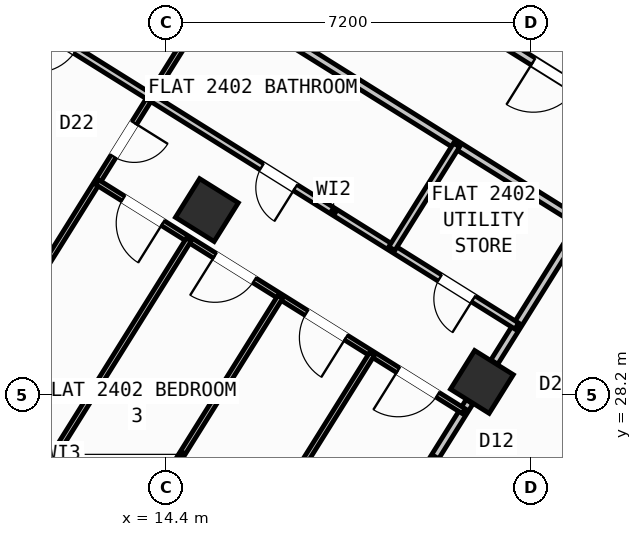
"""IFC4 building model, lengths in metres.
Left out: names, types, materials, properties, quantities, classifications, styles, units other than length and angle.
Written with IfcOpenShell. Run it as: python <this file> out.ifc"""

import sys

from ifc_helpers import new_model, si_unit, direction, frame, frame_2d, origin, origin_2d, place, context, subcontext, project, spatial, rectangle, hollow_rectangle, extrude, source, transform, mapped, element, fill, save


model = new_model("IFC4")
c1 = context("Model", 3, precision=1e-05, world=origin(), true_north=direction((0.0, 1.0)))
c2 = subcontext(c1, "Body", "Model", "MODEL_VIEW")
j1 = project(units=[si_unit("LENGTHUNIT", "METRE"), si_unit("PLANEANGLEUNIT", "RADIAN")], contexts=[c1])
p1 = place(None, origin())
s1 = spatial("IfcSite", under=j1, at=p1, CompositionType="ELEMENT")
p2 = place(p1, origin())
s2 = spatial("IfcBuilding", under=s1, at=p2, CompositionType="ELEMENT")
p3 = place(p2, frame((0.0, 0.0, 97.2)))
s3 = spatial("IfcBuildingStorey", under=s2, at=p3, CompositionType="ELEMENT", Elevation=97.2)
m1 = source(origin(), c2, "Body", "SweptSolid", [
    extrude(hollow_rectangle(XDim=0.9, YDim=0.9, WallThickness=0.036, at=origin_2d()), origin(), (0.0, 0.0, 1.0), 3.6),
])
for number, where, z_axis, x_axis in (
    (1, (20.632, 28.452, 0.0), (0.0, 0.0, 1.0), (-0.848, 0.53, 0.0)),
    (2, (15.205, 31.844, 0.0), (0.0, 0.0, 1.0), (-0.848, 0.53, 0.0)),
):
    element("IfcColumn", number, at=place(p3, frame(where, z_axis=z_axis, x_axis=x_axis)), inside=s3, PredefinedType="COLUMN", context=c2, shape_type="MappedRepresentation", body=[
        mapped(m1, transform((0.0, 0.0, 0.0), scale=1.0)),
    ])
p4 = place(p3, frame((31.76, 12.183, 0.0), z_axis=(0.0, 0.0, 1.0), x_axis=(-0.848047074256, 0.529920899612, 0.0)))
e3 = element("IfcWall", 3, at=p4, inside=s3, PredefinedType="STANDARD", context=c2, shape_type="SweptSolid", body=[
    extrude(rectangle(XDim=30.652, YDim=0.32, at=frame_2d((15.326, 0.0))), origin(), (0.0, 0.0, 1.0), 3.32),
])
p5 = place(p4, frame((15.153, 0.0, 0.0)))
e4 = element("IfcOpeningElement", 4, at=p5, cuts=e3, PredefinedType="OPENING", context=c2, shape_type="SweptSolid", body=[
    extrude(rectangle(XDim=1.2, YDim=2.15, at=frame_2d((0.6, 1.075))), frame((0.0, 0.17, 0.0), z_axis=(0.0, -1.0, 0.0), x_axis=(1.0, 0.0, 0.0)), (0.0, 0.0, 1.0), 0.34),
])
p6 = place(p4, frame((2.002, 0.0, 0.8)))
e5 = element("IfcOpeningElement", 5, at=p6, cuts=e3, PredefinedType="OPENING", context=c2, shape_type="SweptSolid", body=[
    extrude(rectangle(XDim=2.1, YDim=1.55, at=frame_2d((1.05, 0.775))), frame((0.0, 0.17, 0.0), z_axis=(0.0, -1.0, 0.0), x_axis=(1.0, 0.0, 0.0)), (0.0, 0.0, 1.0), 0.34),
])
p7 = place(p4, frame((7.206, 0.0, 0.8)))
e6 = element("IfcOpeningElement", 6, at=p7, cuts=e3, PredefinedType="OPENING", context=c2, shape_type="SweptSolid", body=[
    extrude(rectangle(XDim=2.1, YDim=1.55, at=frame_2d((1.05, 0.775))), frame((0.0, 0.17, 0.0), z_axis=(0.0, -1.0, 0.0), x_axis=(1.0, 0.0, 0.0)), (0.0, 0.0, 1.0), 0.34),
])
p8 = place(p4, frame((12.648, 0.0, 1.0)))
e7 = element("IfcOpeningElement", 7, at=p8, cuts=e3, PredefinedType="OPENING", context=c2, shape_type="SweptSolid", body=[
    extrude(rectangle(XDim=0.9, YDim=1.25, at=frame_2d((0.45, 0.625))), frame((0.0, 0.17, 0.0), z_axis=(0.0, -1.0, 0.0), x_axis=(1.0, 0.0, 0.0)), (0.0, 0.0, 1.0), 0.34),
])
p9 = place(p4, frame((27.974, 0.0, 0.95)))
e8 = element("IfcOpeningElement", 8, at=p9, cuts=e3, PredefinedType="OPENING", context=c2, shape_type="SweptSolid", body=[
    extrude(rectangle(XDim=1.2, YDim=1.4, at=frame_2d((0.6, 0.7))), frame((0.0, 0.17, 0.0), z_axis=(0.0, -1.0, 0.0), x_axis=(1.0, 0.0, 0.0)), (0.0, 0.0, 1.0), 0.34),
])
p10 = place(p4, frame((18.347, 0.0, 1.0)))
e9 = element("IfcOpeningElement", 9, at=p10, cuts=e3, PredefinedType="OPENING", context=c2, shape_type="SweptSolid", body=[
    extrude(rectangle(XDim=0.9, YDim=1.25, at=frame_2d((0.45, 0.625))), frame((0.0, 0.17, 0.0), z_axis=(0.0, -1.0, 0.0), x_axis=(1.0, 0.0, 0.0)), (0.0, 0.0, 1.0), 0.34),
])
p11 = place(p4, frame((20.931, 0.0, 1.0)))
e10 = element("IfcOpeningElement", 10, at=p11, cuts=e3, PredefinedType="OPENING", context=c2, shape_type="SweptSolid", body=[
    extrude(rectangle(XDim=0.65, YDim=1.15, at=frame_2d((0.325, 0.575))), frame((0.0, 0.17, 0.0), z_axis=(0.0, -1.0, 0.0), x_axis=(1.0, 0.0, 0.0)), (0.0, 0.0, 1.0), 0.34),
])
p12 = place(p4, frame((22.938, 0.0, 1.0)))
e11 = element("IfcOpeningElement", 11, at=p12, cuts=e3, PredefinedType="OPENING", context=c2, shape_type="SweptSolid", body=[
    extrude(rectangle(XDim=0.9, YDim=1.25, at=frame_2d((0.45, 0.625))), frame((0.0, 0.17, 0.0), z_axis=(0.0, -1.0, 0.0), x_axis=(1.0, 0.0, 0.0)), (0.0, 0.0, 1.0), 0.34),
])
p13 = place(p4, frame((25.069, 0.0, 1.0)))
e12 = element("IfcOpeningElement", 12, at=p13, cuts=e3, PredefinedType="OPENING", context=c2, shape_type="SweptSolid", body=[
    extrude(rectangle(XDim=0.9, YDim=1.25, at=frame_2d((0.45, 0.625))), frame((0.0, 0.17, 0.0), z_axis=(0.0, -1.0, 0.0), x_axis=(1.0, 0.0, 0.0)), (0.0, 0.0, 1.0), 0.34),
])
p14 = place(p3, frame((5.7, 28.71, 0.0), z_axis=(0.0, 0.0, 1.0), x_axis=(0.529923711467, 0.8480453172, 0.0)))
e13 = element("IfcWall", 13, at=p14, inside=s3, PredefinedType="STANDARD", context=c2, shape_type="SweptSolid", body=[
    extrude(rectangle(XDim=21.587, YDim=0.32, at=frame_2d((10.794, 0.0))), origin(), (0.0, 0.0, 1.0), 2.745),
])
p15 = place(p14, frame((2.994, 0.0, 0.8)))
e14 = element("IfcOpeningElement", 14, at=p15, cuts=e13, PredefinedType="OPENING", context=c2, shape_type="SweptSolid", body=[
    extrude(rectangle(XDim=2.1, YDim=1.55, at=frame_2d((1.05, 0.775))), frame((0.0, 0.17, 0.0), z_axis=(0.0, -1.0, 0.0), x_axis=(1.0, 0.0, 0.0)), (0.0, 0.0, 1.0), 0.34),
])
p16 = place(p14, frame((9.739, 0.0, 1.0)))
e15 = element("IfcOpeningElement", 15, at=p16, cuts=e13, PredefinedType="OPENING", context=c2, shape_type="SweptSolid", body=[
    extrude(rectangle(XDim=0.9, YDim=1.25, at=frame_2d((0.45, 0.625))), frame((0.0, 0.17, 0.0), z_axis=(0.0, -1.0, 0.0), x_axis=(1.0, 0.0, 0.0)), (0.0, 0.0, 1.0), 0.34),
])
p17 = place(p14, frame((18.639, 0.0, 0.85)))
e16 = element("IfcOpeningElement", 16, at=p17, cuts=e13, PredefinedType="OPENING", context=c2, shape_type="SweptSolid", body=[
    extrude(rectangle(XDim=1.5, YDim=1.5, at=frame_2d((0.75, 0.75))), frame((0.0, 0.17, 0.0), z_axis=(0.0, -1.0, 0.0), x_axis=(1.0, 0.0, 0.0)), (0.0, 0.0, 1.0), 0.34),
])
p18 = place(p3, frame((17.424, 47.083, 0.0), z_axis=(0.0, 0.0, 1.0), x_axis=(0.848049927979, -0.529916332693, 0.0)))
e17 = element("IfcWall", 17, at=p18, inside=s3, PredefinedType="STANDARD", context=c2, shape_type="SweptSolid", body=[
    extrude(rectangle(XDim=29.223, YDim=0.32, at=frame_2d((14.612, 0.0))), origin(), (0.0, 0.0, 1.0), 3.32),
])
p19 = place(p18, frame((3.745, 0.0, 0.0)))
e18 = element("IfcOpeningElement", 18, at=p19, cuts=e17, PredefinedType="OPENING", context=c2, shape_type="SweptSolid", body=[
    extrude(rectangle(XDim=1.05, YDim=2.15, at=frame_2d((0.525, 1.075))), frame((0.0, 0.17, 0.0), z_axis=(0.0, -1.0, 0.0), x_axis=(1.0, 0.0, 0.0)), (0.0, 0.0, 1.0), 0.34),
])
p20 = place(p18, frame((0.699, 0.0, 0.95)))
e19 = element("IfcOpeningElement", 19, at=p20, cuts=e17, PredefinedType="OPENING", context=c2, shape_type="SweptSolid", body=[
    extrude(rectangle(XDim=1.2, YDim=1.4, at=frame_2d((0.6, 0.7))), frame((0.0, 0.17, 0.0), z_axis=(0.0, -1.0, 0.0), x_axis=(1.0, 0.0, 0.0)), (0.0, 0.0, 1.0), 0.34),
])
p21 = place(p18, frame((6.951, 0.0, 1.0)))
e20 = element("IfcOpeningElement", 20, at=p21, cuts=e17, PredefinedType="OPENING", context=c2, shape_type="SweptSolid", body=[
    extrude(rectangle(XDim=0.9, YDim=1.25, at=frame_2d((0.45, 0.625))), frame((0.0, 0.17, 0.0), z_axis=(0.0, -1.0, 0.0), x_axis=(1.0, 0.0, 0.0)), (0.0, 0.0, 1.0), 0.34),
])
p22 = place(p18, frame((9.841, 0.0, 0.85)))
e21 = element("IfcOpeningElement", 21, at=p22, cuts=e17, PredefinedType="OPENING", context=c2, shape_type="SweptSolid", body=[
    extrude(rectangle(XDim=1.5, YDim=1.5, at=frame_2d((0.75, 0.75))), frame((0.0, 0.17, 0.0), z_axis=(0.0, -1.0, 0.0), x_axis=(1.0, 0.0, 0.0)), (0.0, 0.0, 1.0), 0.34),
])
p23 = place(p18, frame((13.889, 0.0, 0.95)))
e22 = element("IfcOpeningElement", 22, at=p23, cuts=e17, PredefinedType="OPENING", context=c2, shape_type="SweptSolid", body=[
    extrude(rectangle(XDim=1.2, YDim=1.4, at=frame_2d((0.6, 0.7))), frame((0.0, 0.17, 0.0), z_axis=(0.0, -1.0, 0.0), x_axis=(1.0, 0.0, 0.0)), (0.0, 0.0, 1.0), 0.34),
])
p24 = place(p18, frame((17.254, 0.0, 1.0)))
e23 = element("IfcOpeningElement", 23, at=p24, cuts=e17, PredefinedType="OPENING", context=c2, shape_type="SweptSolid", body=[
    extrude(rectangle(XDim=0.9, YDim=1.25, at=frame_2d((0.45, 0.625))), frame((0.0, 0.17, 0.0), z_axis=(0.0, -1.0, 0.0), x_axis=(1.0, 0.0, 0.0)), (0.0, 0.0, 1.0), 0.34),
])
p25 = place(p18, frame((20.764, 0.0, 0.8)))
e24 = element("IfcOpeningElement", 24, at=p25, cuts=e17, PredefinedType="OPENING", context=c2, shape_type="SweptSolid", body=[
    extrude(rectangle(XDim=2.1, YDim=1.55, at=frame_2d((1.05, 0.775))), frame((0.0, 0.17, 0.0), z_axis=(0.0, -1.0, 0.0), x_axis=(1.0, 0.0, 0.0)), (0.0, 0.0, 1.0), 0.34),
])
p26 = place(p18, frame((25.403, 0.0, 0.8)))
e25 = element("IfcOpeningElement", 25, at=p26, cuts=e17, PredefinedType="OPENING", context=c2, shape_type="SweptSolid", body=[
    extrude(rectangle(XDim=2.1, YDim=1.55, at=frame_2d((1.05, 0.775))), frame((0.0, 0.17, 0.0), z_axis=(0.0, -1.0, 0.0), x_axis=(1.0, 0.0, 0.0)), (0.0, 0.0, 1.0), 0.34),
])
p27 = place(p3, frame((25.807, 29.582, 0.0), z_axis=(0.0, 0.0, 1.0), x_axis=(-0.529920357077, -0.848047413271, 0.0)))
e26 = element("IfcWall", 26, at=p27, inside=s3, PredefinedType="PARTITIONING", context=c2, shape_type="SweptSolid", body=[
    extrude(rectangle(XDim=11.45, YDim=0.16, at=frame_2d((5.725, 0.0))), origin(), (0.0, 0.0, 1.0), 3.31),
])
p28 = place(p3, frame((26.973, 31.447, 0.0), z_axis=(0.0, 0.0, 1.0), x_axis=(-0.848048310262, 0.529918921593, 0.0)))
e27 = element("IfcWall", 27, at=p28, inside=s3, PredefinedType="PARTITIONING", context=c2, shape_type="SweptSolid", body=[
    extrude(rectangle(XDim=16.73, YDim=0.16, at=frame_2d((8.365, 0.0))), origin(), (0.0, 0.0, 1.0), 3.31),
])
p29 = place(p28, frame((2.22, 0.0, 0.0)))
e28 = element("IfcOpeningElement", 28, at=p29, cuts=e27, PredefinedType="OPENING", context=c2, shape_type="SweptSolid", body=[
    extrude(rectangle(XDim=0.86, YDim=2.05, at=frame_2d((0.43, 1.025))), frame((0.0, 0.09, 0.0), z_axis=(0.0, -1.0, 0.0), x_axis=(1.0, 0.0, 0.0)), (0.0, 0.0, 1.0), 0.18),
])
p30 = place(p28, frame((5.28, 0.0, 0.0)))
e29 = element("IfcOpeningElement", 29, at=p30, cuts=e27, PredefinedType="OPENING", context=c2, shape_type="SweptSolid", body=[
    extrude(rectangle(XDim=1.0, YDim=2.1, at=frame_2d((0.5, 1.05))), frame((0.0, 0.09, 0.0), z_axis=(0.0, -1.0, 0.0), x_axis=(1.0, 0.0, 0.0)), (0.0, 0.0, 1.0), 0.18),
])
p31 = place(p3, frame((25.807, 29.582, 0.0), z_axis=(0.0, 0.0, 1.0), x_axis=(-0.848052408131, 0.529912363569, 0.0)))
e30 = element("IfcWall", 30, at=p31, inside=s3, PredefinedType="PARTITIONING", context=c2, shape_type="SweptSolid", body=[
    extrude(rectangle(XDim=16.73, YDim=0.16, at=frame_2d((8.365, 0.0))), origin(), (0.0, 0.0, 1.0), 3.31),
])
p32 = place(p31, frame((2.22, 0.0, 0.0)))
e31 = element("IfcOpeningElement", 31, at=p32, cuts=e30, PredefinedType="OPENING", context=c2, shape_type="SweptSolid", body=[
    extrude(rectangle(XDim=0.86, YDim=2.05, at=frame_2d((0.43, 1.025))), frame((0.0, 0.09, 0.0), z_axis=(0.0, -1.0, 0.0), x_axis=(1.0, 0.0, 0.0)), (0.0, 0.0, 1.0), 0.18),
])
p33 = place(p31, frame((14.013, 0.0, 0.0)))
e32 = element("IfcOpeningElement", 32, at=p33, cuts=e30, PredefinedType="OPENING", context=c2, shape_type="SweptSolid", body=[
    extrude(rectangle(XDim=1.0, YDim=2.1, at=frame_2d((0.5, 1.05))), frame((0.0, 0.09, 0.0), z_axis=(0.0, -1.0, 0.0), x_axis=(1.0, 0.0, 0.0)), (0.0, 0.0, 1.0), 0.18),
])
p34 = place(p3, frame((22.593, 31.59, 0.0), z_axis=(0.0, 0.0, 1.0), x_axis=(-0.529924383291, -0.848044897393, 0.0)))
e33 = element("IfcWall", 33, at=p34, inside=s3, PredefinedType="PARTITIONING", context=c2, shape_type="SweptSolid", body=[
    extrude(rectangle(XDim=3.238, YDim=0.16, at=frame_2d((1.619, 0.0))), origin(), (0.0, 0.0, 1.0), 2.745),
])
p35 = place(p3, frame((20.387, 28.06, 0.0), z_axis=(0.0, 0.0, 1.0), x_axis=(-0.529902564924, -0.848058530814, 0.0)))
e34 = element("IfcWall", 34, at=p35, inside=s3, PredefinedType="PARTITIONING", context=c2, shape_type="SweptSolid", body=[
    extrude(rectangle(XDim=6.376, YDim=0.16, at=frame_2d((3.188, 0.0))), origin(), (0.0, 0.0, 1.0), 2.745),
])
p36 = place(p3, frame((24.492, 30.403, 0.0), z_axis=(0.0, 0.0, 1.0), x_axis=(-0.529919283494, -0.848048084121, 0.0)))
e35 = element("IfcWall", 35, at=p36, inside=s3, PredefinedType="PLUMBINGWALL", context=c2, shape_type="SweptSolid", body=[
    extrude(rectangle(XDim=5.51, YDim=0.14, at=frame_2d((2.755, 0.0))), origin(), (0.0, 0.0, 1.0), 2.935),
])
p37 = place(p36, frame((2.365, 0.0, 0.0)))
e36 = element("IfcOpeningElement", 36, at=p37, cuts=e35, PredefinedType="OPENING", context=c2, shape_type="SweptSolid", body=[
    extrude(rectangle(XDim=0.78, YDim=2.05, at=frame_2d((0.39, 1.025))), frame((0.0, 0.08, 0.0), z_axis=(0.0, -1.0, 0.0), x_axis=(1.0, 0.0, 0.0)), (0.0, 0.0, 1.0), 0.16),
])
p38 = place(p3, frame((15.361, 36.108, 0.0), z_axis=(0.0, 0.0, 1.0), x_axis=(-0.529912802348, -0.848052133956, 0.0)))
e37 = element("IfcWall", 37, at=p38, inside=s3, PredefinedType="PARTITIONING", context=c2, shape_type="SweptSolid", body=[
    extrude(rectangle(XDim=11.72, YDim=0.11, at=frame_2d((5.86, 0.0))), origin(), (0.0, 0.0, 1.0), 2.935),
])
p39 = place(p38, frame((3.0, 0.0, 0.0)))
e38 = element("IfcOpeningElement", 38, at=p39, cuts=e37, PredefinedType="OPENING", context=c2, shape_type="SweptSolid", body=[
    extrude(rectangle(XDim=0.78, YDim=2.05, at=frame_2d((0.39, 1.025))), frame((0.0, 0.065, 0.0), z_axis=(0.0, -1.0, 0.0), x_axis=(1.0, 0.0, 0.0)), (0.0, 0.0, 1.0), 0.13),
])
p40 = place(p3, frame((14.09, 34.073, 0.0), z_axis=(0.0, 0.0, 1.0), x_axis=(-0.848045135007, 0.529924003034, 0.0)))
e39 = element("IfcWall", 39, at=p40, inside=s3, PredefinedType="PLUMBINGWALL", context=c2, shape_type="SweptSolid", body=[
    extrude(rectangle(XDim=4.393, YDim=0.14, at=frame_2d((2.196, 0.0))), origin(), (0.0, 0.0, 1.0), 3.31),
])
p41 = place(p40, frame((1.737, 0.0, 0.0)))
e40 = element("IfcOpeningElement", 40, at=p41, cuts=e39, PredefinedType="OPENING", context=c2, shape_type="SweptSolid", body=[
    extrude(rectangle(XDim=0.92, YDim=2.08, at=frame_2d((0.46, 1.04))), frame((0.0, 0.08, 0.0), z_axis=(0.0, -1.0, 0.0), x_axis=(1.0, 0.0, 0.0)), (0.0, 0.0, 1.0), 0.16),
])
p42 = place(p3, frame((21.321, 29.554, 0.0), z_axis=(0.0, 0.0, 1.0), x_axis=(-0.84803529765, 0.529939745575, 0.0)))
e41 = element("IfcWall", 41, at=p42, inside=s3, PredefinedType="PLUMBINGWALL", context=c2, shape_type="SweptSolid", body=[
    extrude(rectangle(XDim=8.527, YDim=0.14, at=frame_2d((4.264, 0.0))), origin(), (0.0, 0.0, 1.0), 3.31),
])
p43 = place(p42, frame((5.155, 0.0, 0.0)))
e42 = element("IfcOpeningElement", 42, at=p43, cuts=e41, PredefinedType="OPENING", context=c2, shape_type="SweptSolid", body=[
    extrude(rectangle(XDim=0.78, YDim=2.05, at=frame_2d((0.39, 1.025))), frame((0.0, 0.08, 0.0), z_axis=(0.0, -1.0, 0.0), x_axis=(1.0, 0.0, 0.0)), (0.0, 0.0, 1.0), 0.16),
])
p44 = place(p42, frame((1.011, 0.0, 0.0)))
e43 = element("IfcOpeningElement", 43, at=p44, cuts=e41, PredefinedType="OPENING", context=c2, shape_type="SweptSolid", body=[
    extrude(rectangle(XDim=0.78, YDim=2.05, at=frame_2d((0.39, 1.025))), frame((0.0, 0.08, 0.0), z_axis=(0.0, -1.0, 0.0), x_axis=(1.0, 0.0, 0.0)), (0.0, 0.0, 1.0), 0.16),
])
p45 = place(p3, frame((20.132, 33.128, 0.0), z_axis=(0.0, 0.0, 1.0), x_axis=(-0.529935194983, -0.848038141311, 0.0)))
e44 = element("IfcWall", 44, at=p45, inside=s3, PredefinedType="PLUMBINGWALL", context=c2, shape_type="SweptSolid", body=[
    extrude(rectangle(XDim=2.41, YDim=0.14, at=frame_2d((1.205, 0.0))), origin(), (0.0, 0.0, 1.0), 3.31),
])
p46 = place(p3, frame((20.272, 27.875, 0.0), z_axis=(0.0, 0.0, 1.0), x_axis=(-0.848056204746, 0.529906287557, 0.0)))
e45 = element("IfcWall", 45, at=p46, inside=s3, PredefinedType="PARTITIONING", context=c2, shape_type="SweptSolid", body=[
    extrude(rectangle(XDim=8.527, YDim=0.11, at=frame_2d((4.264, 0.0))), origin(), (0.0, 0.0, 1.0), 3.31),
])
p47 = place(p46, frame((0.606, 0.0, 0.0)))
e46 = element("IfcOpeningElement", 46, at=p47, cuts=e45, PredefinedType="OPENING", context=c2, shape_type="SweptSolid", body=[
    extrude(rectangle(XDim=0.92, YDim=2.08, at=frame_2d((0.46, 1.04))), frame((0.0, 0.065, 0.0), z_axis=(0.0, -1.0, 0.0), x_axis=(1.0, 0.0, 0.0)), (0.0, 0.0, 1.0), 0.13),
])
p48 = place(p46, frame((2.738, 0.0, 0.0)))
e47 = element("IfcOpeningElement", 47, at=p48, cuts=e45, PredefinedType="OPENING", context=c2, shape_type="SweptSolid", body=[
    extrude(rectangle(XDim=0.92, YDim=2.08, at=frame_2d((0.46, 1.04))), frame((0.0, 0.065, 0.0), z_axis=(0.0, -1.0, 0.0), x_axis=(1.0, 0.0, 0.0)), (0.0, 0.0, 1.0), 0.13),
])
p49 = place(p46, frame((4.869, 0.0, 0.0)))
e48 = element("IfcOpeningElement", 48, at=p49, cuts=e45, PredefinedType="OPENING", context=c2, shape_type="SweptSolid", body=[
    extrude(rectangle(XDim=0.92, YDim=2.08, at=frame_2d((0.46, 1.04))), frame((0.0, 0.065, 0.0), z_axis=(0.0, -1.0, 0.0), x_axis=(1.0, 0.0, 0.0)), (0.0, 0.0, 1.0), 0.13),
])
p50 = place(p46, frame((7.001, 0.0, 0.0)))
e49 = element("IfcOpeningElement", 49, at=p50, cuts=e45, PredefinedType="OPENING", context=c2, shape_type="SweptSolid", body=[
    extrude(rectangle(XDim=0.92, YDim=2.08, at=frame_2d((0.46, 1.04))), frame((0.0, 0.065, 0.0), z_axis=(0.0, -1.0, 0.0), x_axis=(1.0, 0.0, 0.0)), (0.0, 0.0, 1.0), 0.13),
])
for number, where, z_axis, x_axis in (
    (50, (18.464, 29.005, 0.0), (0.0, 0.0, 1.0), (-0.53, -0.848, 0.0)),
    (51, (16.656, 30.135, 0.0), (0.0, 0.0, 1.0), (-0.53, -0.848, 0.0)),
):
    element("IfcWall", number, at=place(p3, frame(where, z_axis=z_axis, x_axis=x_axis)), inside=s3, PredefinedType="PARTITIONING", context=c2, shape_type="SweptSolid", body=[
        extrude(rectangle(XDim=7.34, YDim=0.11, at=frame_2d((3.67, 0.0))), origin(), (0.0, 0.0, 1.0), 2.935),
    ])
p51 = place(p3, frame((14.848, 31.264, 0.0), z_axis=(0.0, 0.0, 1.0), x_axis=(-0.529920534869, -0.848047302174, 0.0)))
e52 = element("IfcWall", 52, at=p51, inside=s3, PredefinedType="PARTITIONING", context=c2, shape_type="SweptSolid", body=[
    extrude(rectangle(XDim=6.158, YDim=0.11, at=frame_2d((3.079, 0.0))), origin(), (0.0, 0.0, 1.0), 2.745),
])
m2 = source(origin(), c2, "Body", "SweptSolid", [
    extrude(rectangle(XDim=0.78, YDim=2.05, at=frame_2d((0.39, 1.025))), frame((0.0, 0.025, 0.0), z_axis=(0.0, -1.0, 0.0), x_axis=(1.0, 0.0, 0.0)), (0.0, 0.0, 1.0), 0.05),
])
p52 = place(p39, origin())
e53 = element("IfcDoor", 53, at=p52, inside=s3, OperationType="SINGLE_SWING_LEFT", PredefinedType="DOOR", context=c2, shape_type="MappedRepresentation", body=[
    mapped(m2, transform((0.0, 0.0, 0.0), scale=1.0)),
])
fill(e38, e53)
p53 = place(p43, origin())
e54 = element("IfcDoor", 54, at=p53, inside=s3, OperationType="SINGLE_SWING_LEFT", PredefinedType="DOOR", context=c2, shape_type="MappedRepresentation", body=[
    mapped(m2, transform((0.0, 0.0, 0.0), scale=1.0)),
])
fill(e42, e54)
p54 = place(p44, origin())
e55 = element("IfcDoor", 55, at=p54, inside=s3, OperationType="SINGLE_SWING_LEFT", PredefinedType="DOOR", context=c2, shape_type="MappedRepresentation", body=[
    mapped(m2, transform((0.0, 0.0, 0.0), scale=1.0)),
])
fill(e43, e55)
m3 = source(origin(), c2, "Body", "SweptSolid", [
    extrude(rectangle(XDim=0.92, YDim=2.08, at=frame_2d((0.46, 1.04))), frame((0.0, 0.025, 0.0), z_axis=(0.0, -1.0, 0.0), x_axis=(1.0, 0.0, 0.0)), (0.0, 0.0, 1.0), 0.05),
])
p55 = place(p47, origin())
e56 = element("IfcDoor", 56, at=p55, inside=s3, OperationType="SINGLE_SWING_RIGHT", PredefinedType="DOOR", context=c2, shape_type="MappedRepresentation", body=[
    mapped(m3, transform((0.0, 0.0, 0.0), scale=1.0)),
])
fill(e46, e56)
p56 = place(p48, origin())
e57 = element("IfcDoor", 57, at=p56, inside=s3, OperationType="SINGLE_SWING_LEFT", PredefinedType="DOOR", context=c2, shape_type="MappedRepresentation", body=[
    mapped(m3, transform((0.0, 0.0, 0.0), scale=1.0)),
])
fill(e47, e57)
p57 = place(p49, origin())
e58 = element("IfcDoor", 58, at=p57, inside=s3, OperationType="SINGLE_SWING_RIGHT", PredefinedType="DOOR", context=c2, shape_type="MappedRepresentation", body=[
    mapped(m3, transform((0.0, 0.0, 0.0), scale=1.0)),
])
fill(e48, e58)
p58 = place(p50, origin())
e59 = element("IfcDoor", 59, at=p58, inside=s3, OperationType="SINGLE_SWING_LEFT", PredefinedType="DOOR", context=c2, shape_type="MappedRepresentation", body=[
    mapped(m3, transform((0.0, 0.0, 0.0), scale=1.0)),
])
fill(e49, e59)
m4 = source(origin(), c2, "Body", "SweptSolid", [
    extrude(rectangle(XDim=1.0, YDim=2.1, at=frame_2d((0.5, 1.05))), frame((0.0, 0.025, 0.0), z_axis=(0.0, -1.0, 0.0), x_axis=(1.0, 0.0, 0.0)), (0.0, 0.0, 1.0), 0.05),
])
p59 = place(p30, origin())
e60 = element("IfcDoor", 60, at=p59, inside=s3, OperationType="SINGLE_SWING_RIGHT", PredefinedType="DOOR", context=c2, shape_type="MappedRepresentation", body=[
    mapped(m4, transform((0.0, 0.0, 0.0), scale=1.0)),
])
fill(e29, e60)
save(model, sys.argv[1])
